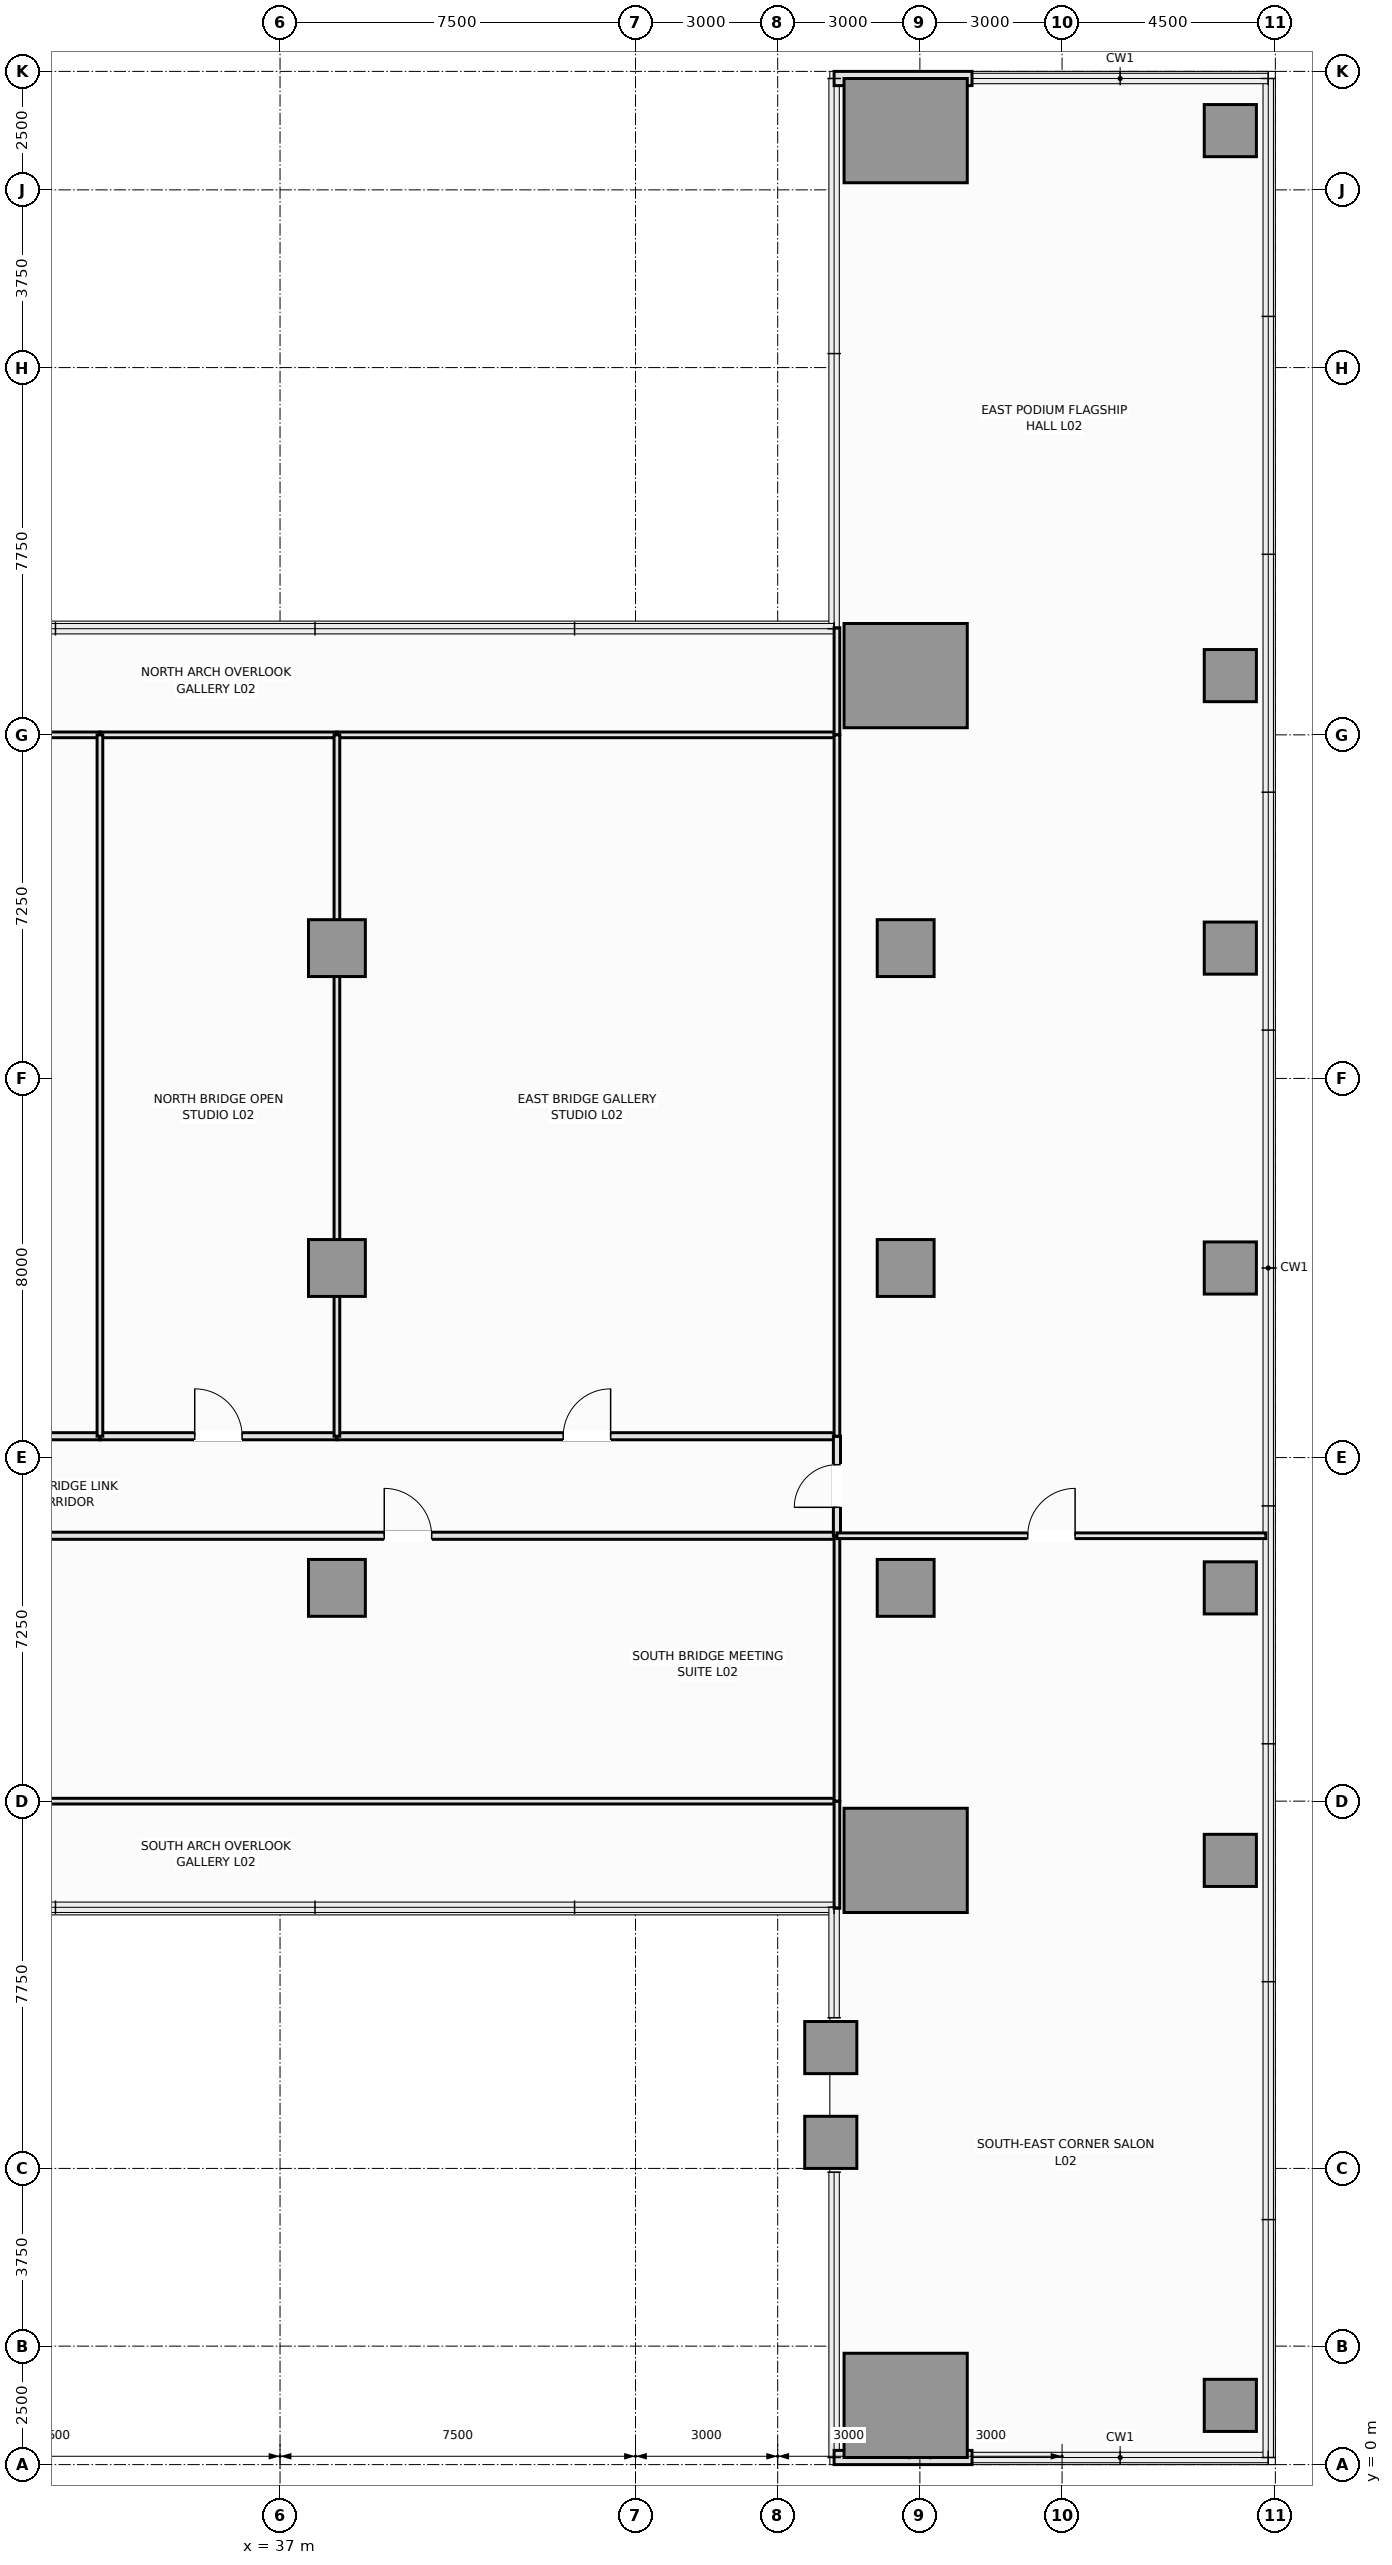
"""IFC4 building model, lengths in metres.
Left out: names, types, materials, properties, quantities, classifications, styles, units other than length and angle.
Written with IfcOpenShell. Run it as: python <this file> out.ifc"""

import sys

from ifc_helpers import new_model, si_unit, direction, frame, frame_2d, origin, origin_2d, place, context, subcontext, project, spatial, rectangle, extrude, element, fill, save


model = new_model("IFC4")
c1 = context("Model", 3, precision=1e-05, world=origin(), true_north=direction((0.0, 1.0)))
c2 = subcontext(c1, "Body", "Model", "MODEL_VIEW")
j1 = project(units=[si_unit("LENGTHUNIT", "METRE"), si_unit("PLANEANGLEUNIT", "RADIAN")], contexts=[c1])
p1 = place(None, origin())
s1 = spatial("IfcSite", under=j1, at=p1, CompositionType="ELEMENT")
p2 = place(p1, origin())
s2 = spatial("IfcBuilding", under=s1, at=p2, CompositionType="ELEMENT")
p3 = place(p2, frame((0.0, 0.0, 10.8)))
s3 = spatial("IfcBuildingStorey", under=s2, at=p3, CompositionType="ELEMENT", Elevation=10.8)
for number, where, z_axis, x_axis in (
    (1, (38.2, 18.5, 0.0), (0.0, 0.0, 1.0), (1.0, 0.0, 0.0)),
    (2, (38.2, 25.25, 0.0), (0.0, 0.0, 1.0), (1.0, 0.0, 0.0)),
    (3, (38.2, 32.0, 0.0), (0.0, 0.0, 1.0), (1.0, 0.0, 0.0)),
):
    element("IfcColumn", number, at=place(p3, frame(where, z_axis=z_axis, x_axis=x_axis)), inside=s3, PredefinedType="COLUMN", context=c2, shape_type="SweptSolid", body=[
        extrude(rectangle(XDim=1.2, YDim=1.2, at=origin_2d()), origin(), (0.0, 0.0, 1.0), 4.8),
    ])
for number, where, z_axis, x_axis in (
    (4, (50.2, 1.25, 0.0), (0.0, 0.0, 1.0), (1.0, 0.0, 0.0)),
    (5, (50.2, 12.75, 0.0), (0.0, 0.0, 1.0), (1.0, 0.0, 0.0)),
    (6, (50.2, 37.75, 0.0), (0.0, 0.0, 1.0), (1.0, 0.0, 0.0)),
    (7, (50.2, 49.25, 0.0), (0.0, 0.0, 1.0), (1.0, 0.0, 0.0)),
):
    element("IfcColumn", number, at=place(p3, frame(where, z_axis=z_axis, x_axis=x_axis)), inside=s3, PredefinedType="COLUMN", context=c2, shape_type="SweptSolid", body=[
        extrude(rectangle(XDim=2.6, YDim=2.2, at=origin_2d()), origin(), (0.0, 0.0, 1.0), 4.8),
    ])
for number, where, z_axis, x_axis in (
    (8, (50.2, 18.5, 0.0), (0.0, 0.0, 1.0), (1.0, 0.0, 0.0)),
    (9, (50.2, 25.25, 0.0), (0.0, 0.0, 1.0), (1.0, 0.0, 0.0)),
    (10, (50.2, 32.0, 0.0), (0.0, 0.0, 1.0), (1.0, 0.0, 0.0)),
):
    element("IfcColumn", number, at=place(p3, frame(where, z_axis=z_axis, x_axis=x_axis)), inside=s3, PredefinedType="COLUMN", context=c2, shape_type="SweptSolid", body=[
        extrude(rectangle(XDim=1.2, YDim=1.2, at=origin_2d()), origin(), (0.0, 0.0, 1.0), 4.8),
    ])
for number, where, z_axis, x_axis in (
    (11, (57.05, 1.25, 0.0), (0.0, 0.0, 1.0), (1.0, 0.0, 0.0)),
    (12, (57.05, 12.75, 0.0), (0.0, 0.0, 1.0), (1.0, 0.0, 0.0)),
    (13, (57.05, 18.5, 0.0), (0.0, 0.0, 1.0), (1.0, 0.0, 0.0)),
    (14, (57.05, 25.25, 0.0), (0.0, 0.0, 1.0), (1.0, 0.0, 0.0)),
    (15, (57.05, 32.0, 0.0), (0.0, 0.0, 1.0), (1.0, 0.0, 0.0)),
    (16, (57.05, 37.75, 0.0), (0.0, 0.0, 1.0), (1.0, 0.0, 0.0)),
    (17, (57.05, 49.25, 0.0), (0.0, 0.0, 1.0), (1.0, 0.0, 0.0)),
    (18, (48.62, 6.8, 0.0), (0.0, 0.0, 1.0), (1.0, 0.0, 0.0)),
    (19, (48.62, 8.8, 0.0), (0.0, 0.0, 1.0), (1.0, 0.0, 0.0)),
):
    element("IfcColumn", number, at=place(p3, frame(where, z_axis=z_axis, x_axis=x_axis)), inside=s3, PredefinedType="COLUMN", context=c2, shape_type="SweptSolid", body=[
        extrude(rectangle(XDim=1.1, YDim=1.1, at=origin_2d()), origin(), (0.0, 0.0, 1.0), 4.8),
    ])
for number, where, z_axis, x_axis in (
    (20, (48.69, 0.15, 0.0), (0.0, 0.0, 1.0), (1.0, 0.0, 0.0)),
    (21, (51.6, 50.35, 0.0), (0.0, 0.0, 1.0), (-1.0, 0.0, 0.0)),
):
    element("IfcWall", number, at=place(p3, frame(where, z_axis=z_axis, x_axis=x_axis)), inside=s3, PredefinedType="SOLIDWALL", context=c2, shape_type="SweptSolid", body=[
        extrude(rectangle(XDim=2.91, YDim=0.3, at=frame_2d((1.455, 0.0))), origin(), (0.0, 0.0, 1.0), 4.6),
    ])
p4 = place(p3, frame((29.9, 19.6, 0.0), z_axis=(0.0, 0.0, 1.0), x_axis=(1.0, 0.0, 0.0)))
e22 = element("IfcWall", 22, at=p4, inside=s3, PredefinedType="PARTITIONING", context=c2, shape_type="SweptSolid", body=[
    extrude(rectangle(XDim=18.85, YDim=0.15, at=frame_2d((9.425, 0.0))), origin(), (0.0, 0.0, 1.0), 4.6),
])
p5 = place(p4, frame((9.299, 0.0, 0.0)))
e23 = element("IfcOpeningElement", 23, at=p5, cuts=e22, PredefinedType="OPENING", context=c2, shape_type="SweptSolid", body=[
    extrude(rectangle(XDim=1.0, YDim=2.15, at=frame_2d((0.5, 1.075))), frame((0.0, 0.085, 0.0), z_axis=(0.0, -1.0, 0.0), x_axis=(1.0, 0.0, 0.0)), (0.0, 0.0, 1.0), 0.17),
])
p6 = place(p3, frame((28.4, 21.7, 0.0), z_axis=(0.0, 0.0, 1.0), x_axis=(1.0, 0.0, 0.0)))
e24 = element("IfcWall", 24, at=p6, inside=s3, PredefinedType="PARTITIONING", context=c2, shape_type="SweptSolid", body=[
    extrude(rectangle(XDim=4.8, YDim=0.15, at=frame_2d((2.4, 0.0))), origin(), (0.0, 0.0, 1.0), 4.6),
])
p7 = place(p6, frame((1.9, 0.0, 0.0)))
e25 = element("IfcOpeningElement", 25, at=p7, cuts=e24, PredefinedType="OPENING", context=c2, shape_type="SweptSolid", body=[
    extrude(rectangle(XDim=1.0, YDim=2.15, at=frame_2d((0.5, 1.075))), frame((0.0, 0.085, 0.0), z_axis=(0.0, -1.0, 0.0), x_axis=(1.0, 0.0, 0.0)), (0.0, 0.0, 1.0), 0.17),
])
p8 = place(p3, frame((33.2, 21.7, 0.0), z_axis=(0.0, 0.0, 1.0), x_axis=(1.0, 0.0, 0.0)))
e26 = element("IfcWall", 26, at=p8, inside=s3, PredefinedType="PARTITIONING", context=c2, shape_type="SweptSolid", body=[
    extrude(rectangle(XDim=5.0, YDim=0.15, at=frame_2d((2.5, 0.0))), origin(), (0.0, 0.0, 1.0), 4.6),
])
p9 = place(p8, frame((2.0, 0.0, 0.0)))
e27 = element("IfcOpeningElement", 27, at=p9, cuts=e26, PredefinedType="OPENING", context=c2, shape_type="SweptSolid", body=[
    extrude(rectangle(XDim=1.0, YDim=2.15, at=frame_2d((0.5, 1.075))), frame((0.0, 0.085, 0.0), z_axis=(0.0, -1.0, 0.0), x_axis=(1.0, 0.0, 0.0)), (0.0, 0.0, 1.0), 0.17),
])
p10 = place(p3, frame((38.2, 21.7, 0.0), z_axis=(0.0, 0.0, 1.0), x_axis=(1.0, 0.0, 0.0)))
e28 = element("IfcWall", 28, at=p10, inside=s3, PredefinedType="PARTITIONING", context=c2, shape_type="SweptSolid", body=[
    extrude(rectangle(XDim=10.55, YDim=0.15, at=frame_2d((5.275, 0.0))), origin(), (0.0, 0.0, 1.0), 4.6),
])
p11 = place(p10, frame((4.775, 0.0, 0.0)))
e29 = element("IfcOpeningElement", 29, at=p11, cuts=e28, PredefinedType="OPENING", context=c2, shape_type="SweptSolid", body=[
    extrude(rectangle(XDim=1.0, YDim=2.15, at=frame_2d((0.5, 1.075))), frame((0.0, 0.085, 0.0), z_axis=(0.0, -1.0, 0.0), x_axis=(1.0, 0.0, 0.0)), (0.0, 0.0, 1.0), 0.17),
])
p12 = place(p3, frame((48.75, 19.6, 0.0), z_axis=(0.0, 0.0, 1.0), x_axis=(0.0, 1.0, 0.0)))
e30 = element("IfcWall", 30, at=p12, inside=s3, PredefinedType="PARTITIONING", context=c2, shape_type="SweptSolid", body=[
    extrude(rectangle(XDim=2.1, YDim=0.15, at=frame_2d((1.05, 0.0))), origin(), (0.0, 0.0, 1.0), 4.6),
])
p13 = place(p12, frame((0.6, 0.0, 0.0)))
e31 = element("IfcOpeningElement", 31, at=p13, cuts=e30, PredefinedType="OPENING", context=c2, shape_type="SweptSolid", body=[
    extrude(rectangle(XDim=0.9, YDim=2.1, at=frame_2d((0.45, 1.05))), frame((0.0, 0.085, 0.0), z_axis=(0.0, -1.0, 0.0), x_axis=(1.0, 0.0, 0.0)), (0.0, 0.0, 1.0), 0.17),
])
p14 = place(p3, frame((29.9, 14.0, 0.0), z_axis=(0.0, 0.0, 1.0), x_axis=(1.0, 0.0, 0.0)))
e32 = element("IfcWall", 32, at=p14, inside=s3, PredefinedType="PARTITIONING", context=c2, shape_type="SweptSolid", body=[
    extrude(rectangle(XDim=18.85, YDim=0.12, at=frame_2d((9.425, 0.0))), origin(), (0.0, 0.0, 1.0), 4.6),
])
p15 = place(p3, frame((48.75, 11.74, 0.0), z_axis=(0.0, 0.0, 1.0), x_axis=(0.0, 1.0, 0.0)))
e33 = element("IfcWall", 33, at=p15, inside=s3, PredefinedType="PARTITIONING", context=c2, shape_type="SweptSolid", body=[
    extrude(rectangle(XDim=2.26, YDim=0.12, at=frame_2d((1.13, 0.0))), origin(), (0.0, 0.0, 1.0), 4.0),
])
p16 = place(p3, frame((28.4, 36.5, 0.0), z_axis=(0.0, 0.0, 1.0), x_axis=(1.0, 0.0, 0.0)))
e34 = element("IfcWall", 34, at=p16, inside=s3, PredefinedType="PARTITIONING", context=c2, shape_type="SweptSolid", body=[
    extrude(rectangle(XDim=4.8, YDim=0.12, at=frame_2d((2.4, 0.0))), origin(), (0.0, 0.0, 1.0), 4.6),
])
p17 = place(p3, frame((33.2, 36.5, 0.0), z_axis=(0.0, 0.0, 1.0), x_axis=(1.0, 0.0, 0.0)))
e35 = element("IfcWall", 35, at=p17, inside=s3, PredefinedType="PARTITIONING", context=c2, shape_type="SweptSolid", body=[
    extrude(rectangle(XDim=5.0, YDim=0.12, at=frame_2d((2.5, 0.0))), origin(), (0.0, 0.0, 1.0), 4.6),
])
p18 = place(p3, frame((38.2, 36.5, 0.0), z_axis=(0.0, 0.0, 1.0), x_axis=(1.0, 0.0, 0.0)))
e36 = element("IfcWall", 36, at=p18, inside=s3, PredefinedType="PARTITIONING", context=c2, shape_type="SweptSolid", body=[
    extrude(rectangle(XDim=10.55, YDim=0.12, at=frame_2d((5.275, 0.0))), origin(), (0.0, 0.0, 1.0), 4.6),
])
p19 = place(p3, frame((48.75, 36.5, 0.0), z_axis=(0.0, 0.0, 1.0), x_axis=(0.0, 1.0, 0.0)))
e37 = element("IfcWall", 37, at=p19, inside=s3, PredefinedType="PARTITIONING", context=c2, shape_type="SweptSolid", body=[
    extrude(rectangle(XDim=2.26, YDim=0.12, at=frame_2d((1.13, 0.0))), origin(), (0.0, 0.0, 1.0), 4.6),
])
p20 = place(p3, frame((48.75, 14.0, 0.0), z_axis=(0.0, 0.0, 1.0), x_axis=(0.0, 1.0, 0.0)))
e38 = element("IfcWall", 38, at=p20, inside=s3, PredefinedType="PARTITIONING", context=c2, shape_type="SweptSolid", body=[
    extrude(rectangle(XDim=5.6, YDim=0.12, at=frame_2d((2.8, 0.0))), origin(), (0.0, 0.0, 1.0), 4.6),
])
p21 = place(p3, frame((33.2, 21.7, 0.0), z_axis=(0.0, 0.0, 1.0), x_axis=(0.0, 1.0, 0.0)))
e39 = element("IfcWall", 39, at=p21, inside=s3, PredefinedType="PARTITIONING", context=c2, shape_type="SweptSolid", body=[
    extrude(rectangle(XDim=14.8, YDim=0.12, at=frame_2d((7.4, 0.0))), origin(), (0.0, 0.0, 1.0), 4.6),
])
p22 = place(p3, frame((38.2, 21.7, 0.0), z_axis=(0.0, 0.0, 1.0), x_axis=(0.0, 1.0, 0.0)))
e40 = element("IfcWall", 40, at=p22, inside=s3, PredefinedType="PARTITIONING", context=c2, shape_type="SweptSolid", body=[
    extrude(rectangle(XDim=14.8, YDim=0.12, at=frame_2d((7.4, 0.0))), origin(), (0.0, 0.0, 1.0), 4.0),
])
p23 = place(p3, frame((48.75, 21.7, 0.0), z_axis=(0.0, 0.0, 1.0), x_axis=(0.0, 1.0, 0.0)))
e41 = element("IfcWall", 41, at=p23, inside=s3, PredefinedType="PARTITIONING", context=c2, shape_type="SweptSolid", body=[
    extrude(rectangle(XDim=14.8, YDim=0.12, at=frame_2d((7.4, 0.0))), origin(), (0.0, 0.0, 1.0), 4.6),
])
p24 = place(p3, frame((48.75, 19.6, 0.0), z_axis=(0.0, 0.0, 1.0), x_axis=(1.0, 0.0, 0.0)))
e42 = element("IfcWall", 42, at=p24, inside=s3, PredefinedType="PARTITIONING", context=c2, shape_type="SweptSolid", body=[
    extrude(rectangle(XDim=9.05, YDim=0.12, at=frame_2d((4.525, 0.0))), origin(), (0.0, 0.0, 1.0), 4.6),
])
p25 = place(p24, frame((4.025, 0.0, 0.0)))
e43 = element("IfcOpeningElement", 43, at=p25, cuts=e42, PredefinedType="OPENING", context=c2, shape_type="SweptSolid", body=[
    extrude(rectangle(XDim=1.0, YDim=2.15, at=frame_2d((0.5, 1.075))), frame((0.0, 0.07, 0.0), z_axis=(0.0, -1.0, 0.0), x_axis=(1.0, 0.0, 0.0)), (0.0, 0.0, 1.0), 0.14),
])
p26 = place(p5, origin())
e44 = element("IfcDoor", 44, at=p26, inside=s3, OperationType="SINGLE_SWING_LEFT", PredefinedType="DOOR", context=c2, shape_type="SweptSolid", body=[
    extrude(rectangle(XDim=1.0, YDim=2.15, at=frame_2d((0.5, 1.075))), frame((0.0, 0.025, 0.0), z_axis=(0.0, -1.0, 0.0), x_axis=(1.0, 0.0, 0.0)), (0.0, 0.0, 1.0), 0.05),
])
fill(e23, e44)
p27 = place(p9, origin())
e45 = element("IfcDoor", 45, at=p27, inside=s3, OperationType="SINGLE_SWING_LEFT", PredefinedType="DOOR", context=c2, shape_type="SweptSolid", body=[
    extrude(rectangle(XDim=1.0, YDim=2.15, at=frame_2d((0.5, 1.075))), frame((0.0, 0.025, 0.0), z_axis=(0.0, -1.0, 0.0), x_axis=(1.0, 0.0, 0.0)), (0.0, 0.0, 1.0), 0.05),
])
fill(e27, e45)
p28 = place(p11, origin())
e46 = element("IfcDoor", 46, at=p28, inside=s3, OperationType="SINGLE_SWING_RIGHT", PredefinedType="DOOR", context=c2, shape_type="SweptSolid", body=[
    extrude(rectangle(XDim=1.0, YDim=2.15, at=frame_2d((0.5, 1.075))), frame((0.0, 0.025, 0.0), z_axis=(0.0, -1.0, 0.0), x_axis=(1.0, 0.0, 0.0)), (0.0, 0.0, 1.0), 0.05),
])
fill(e29, e46)
p29 = place(p13, origin())
e47 = element("IfcDoor", 47, at=p29, inside=s3, OperationType="SINGLE_SWING_LEFT", PredefinedType="DOOR", context=c2, shape_type="SweptSolid", body=[
    extrude(rectangle(XDim=0.9, YDim=2.1, at=frame_2d((0.45, 1.05))), frame((0.0, 0.025, 0.0), z_axis=(0.0, -1.0, 0.0), x_axis=(1.0, 0.0, 0.0)), (0.0, 0.0, 1.0), 0.05),
])
fill(e31, e47)
p30 = place(p25, origin())
e48 = element("IfcDoor", 48, at=p30, inside=s3, OperationType="SINGLE_SWING_RIGHT", PredefinedType="DOOR", context=c2, shape_type="SweptSolid", body=[
    extrude(rectangle(XDim=1.0, YDim=2.15, at=frame_2d((0.5, 1.075))), frame((0.0, 0.025, 0.0), z_axis=(0.0, -1.0, 0.0), x_axis=(1.0, 0.0, 0.0)), (0.0, 0.0, 1.0), 0.05),
])
fill(e43, e48)
save(model, sys.argv[1])
